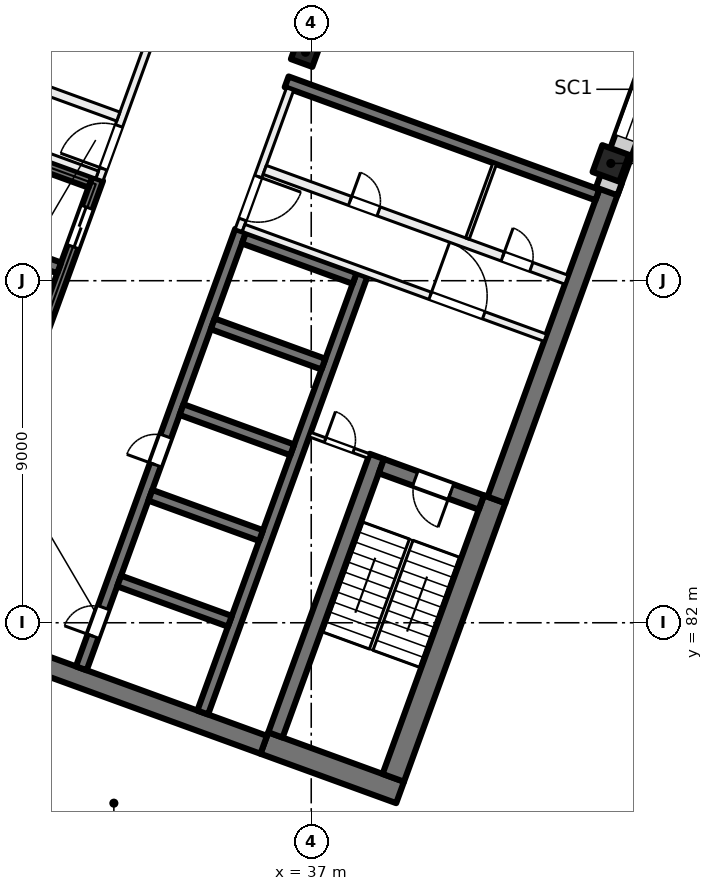
"""IFC4 building model, lengths in metres.
Left out: names, types, materials, properties, quantities, classifications, styles, units other than length and angle.
Written with IfcOpenShell. Run it as: python <this file> out.ifc"""

import sys

from ifc_helpers import new_model, si_unit, direction, frame, frame_2d, origin, origin_2d, place, context, subcontext, project, spatial, rectangle, extrude, element, fill, save


model = new_model("IFC4")
c1 = context("Model", 3, precision=1e-05, world=origin(), true_north=direction((0.0, 1.0)))
c2 = subcontext(c1, "Body", "Model", "MODEL_VIEW")
j1 = project(units=[si_unit("LENGTHUNIT", "METRE"), si_unit("PLANEANGLEUNIT", "RADIAN")], contexts=[c1])
p1 = place(None, origin())
s1 = spatial("IfcSite", under=j1, at=p1, CompositionType="ELEMENT")
p2 = place(p1, origin())
s2 = spatial("IfcBuilding", under=s1, at=p2, CompositionType="ELEMENT")
p3 = place(p2, frame((0.0, 0.0, 200.0)))
s3 = spatial("IfcBuildingStorey", under=s2, at=p3, CompositionType="ELEMENT", Elevation=200.0)
p4 = place(p3, frame((36.849, 97.011, 0.0), z_axis=(0.0, 0.0, 1.0), x_axis=(-0.342020143326, -0.939692620786, 0.0)))
e1 = element("IfcColumn", 1, at=p4, inside=s3, PredefinedType="COLUMN", context=c2, shape_type="SweptSolid", body=[
    extrude(rectangle(XDim=0.6, YDim=0.6, at=origin_2d()), origin(), (0.0, 0.0, 1.0), 4.0),
])
p5 = place(p3, frame((44.884, 94.087, 0.0), z_axis=(0.0, 0.0, 1.0), x_axis=(-0.342020143326, -0.939692620786, 0.0)))
e2 = element("IfcColumn", 2, at=p5, inside=s3, PredefinedType="COLUMN", context=c2, shape_type="SweptSolid", body=[
    extrude(rectangle(XDim=0.75, YDim=0.75, at=origin_2d()), origin(), (0.0, 0.0, 1.0), 4.0),
])
p6 = place(p3, frame((39.338, 77.535, 0.0), z_axis=(0.0, 0.0, 1.0), x_axis=(-0.939701471648, 0.341995824804, 0.0)))
e3 = element("IfcWall", 3, at=p6, inside=s3, PredefinedType="SHEAR", context=c2, shape_type="SweptSolid", body=[
    extrude(rectangle(XDim=3.8, YDim=0.6, at=frame_2d((1.9, 0.0))), origin(), (0.0, 0.0, 1.0), 4.0),
])
p7 = place(p3, frame((35.75, 78.788, 0.0), z_axis=(0.0, 0.0, 1.0), x_axis=(-0.939692894512, 0.342019391267, 0.0)))
e4 = element("IfcWall", 4, at=p7, inside=s3, PredefinedType="SHEAR", context=c2, shape_type="SweptSolid", body=[
    extrude(rectangle(XDim=14.4, YDim=0.5, at=frame_2d((7.2, 0.0))), origin(), (0.0, 0.0, 1.0), 4.0),
])
p8 = place(p3, frame((39.159, 77.92, 0.0), z_axis=(0.0, 0.0, 1.0), x_axis=(0.342016982193, 0.939693771338, 0.0)))
e5 = element("IfcWall", 5, at=p8, inside=s3, PredefinedType="SHEAR", context=c2, shape_type="SweptSolid", body=[
    extrude(rectangle(XDim=7.8, YDim=0.6, at=frame_2d((3.9, 0.0))), origin(), (0.0, 0.0, 1.0), 4.0),
])
p9 = place(p3, frame((41.874, 85.232, 0.0), z_axis=(0.0, 0.0, 1.0), x_axis=(0.342020437038, 0.939692513883, 0.0)))
e6 = element("IfcWall", 6, at=p9, inside=s3, PredefinedType="SHEAR", context=c2, shape_type="SweptSolid", body=[
    extrude(rectangle(XDim=8.975, YDim=0.5, at=frame_2d((4.487, 0.0))), origin(), (0.0, 0.0, 1.0), 4.0),
])
p10 = place(p3, frame((36.058, 79.048, 0.0), z_axis=(0.0, 0.0, 1.0), x_axis=(0.342016982193, 0.939693771338, 0.0)))
e7 = element("IfcWall", 7, at=p10, inside=s3, PredefinedType="SHEAR", context=c2, shape_type="SweptSolid", body=[
    extrude(rectangle(XDim=7.8, YDim=0.4, at=frame_2d((3.9, 0.0))), origin(), (0.0, 0.0, 1.0), 4.0),
])
p11 = place(p3, frame((41.476, 85.164, 0.0), z_axis=(0.0, 0.0, 1.0), x_axis=(-0.939678810556, 0.342058084236, 0.0)))
e8 = element("IfcWall", 8, at=p11, inside=s3, PredefinedType="SHEAR", context=c2, shape_type="SweptSolid", body=[
    extrude(rectangle(XDim=2.8, YDim=0.4, at=frame_2d((1.4, 0.0))), origin(), (0.0, 0.0, 1.0), 4.0),
])
p12 = place(p11, frame((0.85, 0.0, 0.0)))
e9 = element("IfcOpeningElement", 9, at=p12, cuts=e8, PredefinedType="OPENING", context=c2, shape_type="SweptSolid", body=[
    extrude(rectangle(XDim=1.0, YDim=2.1, at=frame_2d((0.5, 1.05))), frame((0.0, 0.21, 0.0), z_axis=(0.0, -1.0, 0.0), x_axis=(1.0, 0.0, 0.0)), (0.0, 0.0, 1.0), 0.42),
])
p13 = place(p3, frame((30.949, 80.801, 0.0), z_axis=(0.0, 0.0, 1.0), x_axis=(0.342016684409, 0.939693879721, 0.0)))
e10 = element("IfcWall", 10, at=p13, inside=s3, PredefinedType="SHEAR", context=c2, shape_type="SweptSolid", body=[
    extrude(rectangle(XDim=12.25, YDim=0.3, at=frame_2d((6.125, 0.0))), origin(), (0.0, 0.0, 1.0), 4.0),
])
p14 = place(p13, frame((0.9, 0.0, 0.0)))
e11 = element("IfcOpeningElement", 11, at=p14, cuts=e10, PredefinedType="OPENING", context=c2, shape_type="SweptSolid", body=[
    extrude(rectangle(XDim=0.8, YDim=2.1, at=frame_2d((0.4, 1.05))), frame((0.0, 0.16, 0.0), z_axis=(0.0, -1.0, 0.0), x_axis=(1.0, 0.0, 0.0)), (0.0, 0.0, 1.0), 0.32),
])
p15 = place(p13, frame((5.7, 0.0, 0.0)))
e12 = element("IfcOpeningElement", 12, at=p15, cuts=e10, PredefinedType="OPENING", context=c2, shape_type="SweptSolid", body=[
    extrude(rectangle(XDim=0.8, YDim=2.1, at=frame_2d((0.4, 1.05))), frame((0.0, 0.16, 0.0), z_axis=(0.0, -1.0, 0.0), x_axis=(1.0, 0.0, 0.0)), (0.0, 0.0, 1.0), 0.32),
])
p16 = place(p3, frame((34.144, 79.638, 0.0), z_axis=(0.0, 0.0, 1.0), x_axis=(0.342016684409, 0.939693879721, 0.0)))
e13 = element("IfcWall", 13, at=p16, inside=s3, PredefinedType="SHEAR", context=c2, shape_type="SweptSolid", body=[
    extrude(rectangle(XDim=12.25, YDim=0.3, at=frame_2d((6.125, 0.0))), origin(), (0.0, 0.0, 1.0), 4.0),
])
p17 = place(p3, frame((34.858, 82.039, 0.0), z_axis=(0.0, 0.0, 1.0), x_axis=(-0.939689908313, 0.342027595692, 0.0)))
e14 = element("IfcWall", 14, at=p17, inside=s3, PredefinedType="SHEAR", context=c2, shape_type="SweptSolid", body=[
    extrude(rectangle(XDim=3.1, YDim=0.3, at=frame_2d((1.55, 0.0))), origin(), (0.0, 0.0, 1.0), 4.0),
])
p18 = place(p3, frame((35.679, 84.294, 0.0), z_axis=(0.0, 0.0, 1.0), x_axis=(-0.939706007505, 0.341983361377, 0.0)))
e15 = element("IfcWall", 15, at=p18, inside=s3, PredefinedType="SHEAR", context=c2, shape_type="SweptSolid", body=[
    extrude(rectangle(XDim=3.1, YDim=0.3, at=frame_2d((1.55, 0.0))), origin(), (0.0, 0.0, 1.0), 4.0),
])
for number, where, z_axis, x_axis in (
    (16, (36.5, 86.549, 0.0), (0.0, 0.0, 1.0), (-0.94, 0.342, 0.0)),
    (17, (37.321, 88.805, 0.0), (0.0, 0.0, 1.0), (-0.94, 0.342, 0.0)),
    (18, (38.142, 91.06, 0.0), (0.0, 0.0, 1.0), (-0.94, 0.342, 0.0)),
):
    element("IfcWall", number, at=place(p3, frame(where, z_axis=z_axis, x_axis=x_axis)), inside=s3, PredefinedType="SHEAR", context=c2, shape_type="SweptSolid", body=[
        extrude(rectangle(XDim=3.1, YDim=0.3, at=frame_2d((1.55, 0.0))), origin(), (0.0, 0.0, 1.0), 4.0),
    ])
p19 = place(p3, frame((27.191, 82.169, 0.0), z_axis=(0.0, 0.0, 1.0), x_axis=(0.342016684409, 0.939693879721, 0.0)))
e19 = element("IfcWall", 19, at=p19, inside=s3, PredefinedType="SHEAR", context=c2, shape_type="SweptSolid", body=[
    extrude(rectangle(XDim=12.25, YDim=0.3, at=frame_2d((6.125, 0.0))), origin(), (0.0, 0.0, 1.0), 4.0),
])
p20 = place(p19, frame((0.75, 0.0, 0.0)))
e20 = element("IfcOpeningElement", 20, at=p20, cuts=e19, PredefinedType="OPENING", context=c2, shape_type="SweptSolid", body=[
    extrude(rectangle(XDim=1.1, YDim=2.1, at=frame_2d((0.55, 1.05))), frame((0.0, 0.16, 0.0), z_axis=(0.0, -1.0, 0.0), x_axis=(1.0, 0.0, 0.0)), (0.0, 0.0, 1.0), 0.32),
])
p21 = place(p19, frame((3.15, 0.0, 0.0)))
e21 = element("IfcOpeningElement", 21, at=p21, cuts=e19, PredefinedType="OPENING", context=c2, shape_type="SweptSolid", body=[
    extrude(rectangle(XDim=1.1, YDim=2.1, at=frame_2d((0.55, 1.05))), frame((0.0, 0.16, 0.0), z_axis=(0.0, -1.0, 0.0), x_axis=(1.0, 0.0, 0.0)), (0.0, 0.0, 1.0), 0.32),
])
p22 = place(p19, frame((5.55, 0.0, 0.0)))
e22 = element("IfcOpeningElement", 22, at=p22, cuts=e19, PredefinedType="OPENING", context=c2, shape_type="SweptSolid", body=[
    extrude(rectangle(XDim=1.1, YDim=2.1, at=frame_2d((0.55, 1.05))), frame((0.0, 0.16, 0.0), z_axis=(0.0, -1.0, 0.0), x_axis=(1.0, 0.0, 0.0)), (0.0, 0.0, 1.0), 0.32),
])
p23 = place(p19, frame((10.35, 0.0, 0.0)))
e23 = element("IfcOpeningElement", 23, at=p23, cuts=e19, PredefinedType="OPENING", context=c2, shape_type="SweptSolid", body=[
    extrude(rectangle(XDim=1.1, YDim=2.1, at=frame_2d((0.55, 1.05))), frame((0.0, 0.16, 0.0), z_axis=(0.0, -1.0, 0.0), x_axis=(1.0, 0.0, 0.0)), (0.0, 0.0, 1.0), 0.32),
])
for number, where, z_axis, x_axis in (
    (24, (30.367, 91.336, 0.0), (0.0, 0.0, 1.0), (-0.94, 0.342, 0.0)),
    (25, (31.188, 93.591, 0.0), (0.0, 0.0, 1.0), (-0.94, 0.342, 0.0)),
):
    element("IfcWall", number, at=place(p3, frame(where, z_axis=z_axis, x_axis=x_axis)), inside=s3, PredefinedType="SHEAR", context=c2, shape_type="SweptSolid", body=[
        extrude(rectangle(XDim=3.1, YDim=0.3, at=frame_2d((1.55, 0.0))), origin(), (0.0, 0.0, 1.0), 4.0),
    ])
p24 = place(p3, frame((44.529, 93.258, 0.0), z_axis=(0.0, 0.0, 1.0), x_axis=(-0.9396917844, 0.342022441267, 0.0)))
e26 = element("IfcWall", 26, at=p24, inside=s3, PredefinedType="SHEAR", context=c2, shape_type="SweptSolid", body=[
    extrude(rectangle(XDim=8.7, YDim=0.3, at=frame_2d((4.35, 0.0))), origin(), (0.0, 0.0, 1.0), 4.0),
])
p25 = place(p3, frame((52.212, 113.783, 0.0), z_axis=(0.0, 0.0, 1.0), x_axis=(-0.34202521188, -0.939690775968, 0.0)))
e27 = element("IfcWall", 27, at=p25, inside=s3, PredefinedType="SOLIDWALL", context=c2, shape_type="SweptSolid", body=[
    extrude(rectangle(XDim=21.745, YDim=0.6, at=frame_2d((10.873, 0.0))), origin(), (0.0, 0.0, 1.0), 3.625),
])
p26 = place(p25, frame((3.765, 0.0, 0.9)))
e28 = element("IfcOpeningElement", 28, at=p26, cuts=e27, PredefinedType="OPENING", context=c2, shape_type="SweptSolid", body=[
    extrude(rectangle(XDim=3.0, YDim=2.4, at=frame_2d((1.5, 1.2))), frame((0.0, 0.31, 0.0), z_axis=(0.0, -1.0, 0.0), x_axis=(1.0, 0.0, 0.0)), (0.0, 0.0, 1.0), 0.62),
])
p27 = place(p25, frame((8.265, 0.0, 0.9)))
e29 = element("IfcOpeningElement", 29, at=p27, cuts=e27, PredefinedType="OPENING", context=c2, shape_type="SweptSolid", body=[
    extrude(rectangle(XDim=3.0, YDim=2.4, at=frame_2d((1.5, 1.2))), frame((0.0, 0.31, 0.0), z_axis=(0.0, -1.0, 0.0), x_axis=(1.0, 0.0, 0.0)), (0.0, 0.0, 1.0), 0.62),
])
p28 = place(p25, frame((12.765, 0.0, 0.9)))
e30 = element("IfcOpeningElement", 30, at=p28, cuts=e27, PredefinedType="OPENING", context=c2, shape_type="SweptSolid", body=[
    extrude(rectangle(XDim=3.0, YDim=2.4, at=frame_2d((1.5, 1.2))), frame((0.0, 0.31, 0.0), z_axis=(0.0, -1.0, 0.0), x_axis=(1.0, 0.0, 0.0)), (0.0, 0.0, 1.0), 0.62),
])
p29 = place(p25, frame((17.265, 0.0, 0.9)))
e31 = element("IfcOpeningElement", 31, at=p29, cuts=e27, PredefinedType="OPENING", context=c2, shape_type="SweptSolid", body=[
    extrude(rectangle(XDim=3.0, YDim=2.4, at=frame_2d((1.5, 1.2))), frame((0.0, 0.31, 0.0), z_axis=(0.0, -1.0, 0.0), x_axis=(1.0, 0.0, 0.0)), (0.0, 0.0, 1.0), 0.62),
])
p30 = place(p3, frame((31.427, 93.663, 0.0), z_axis=(0.0, 0.0, 1.0), x_axis=(0.342030870568, 0.93968871632, 0.0)))
e32 = element("IfcWall", 32, at=p30, inside=s3, PredefinedType="PARTITIONING", context=c2, shape_type="SweptSolid", body=[
    extrude(rectangle(XDim=3.95, YDim=0.2, at=frame_2d((1.975, 0.0))), origin(), (0.0, 0.0, 1.0), 3.625),
])
p31 = place(p30, frame((0.3, 0.0, 0.0)))
e33 = element("IfcOpeningElement", 33, at=p31, cuts=e32, PredefinedType="OPENING", context=c2, shape_type="SweptSolid", body=[
    extrude(rectangle(XDim=1.2, YDim=2.1, at=frame_2d((0.6, 1.05))), frame((0.0, 0.11, 0.0), z_axis=(0.0, -1.0, 0.0), x_axis=(1.0, 0.0, 0.0)), (0.0, 0.0, 1.0), 0.22),
])
p32 = place(p3, frame((23.427, 96.682, 0.0), z_axis=(0.0, 0.0, 1.0), x_axis=(0.939690465531, -0.342026064782, 0.0)))
e34 = element("IfcWall", 34, at=p32, inside=s3, PredefinedType="PARTITIONING", context=c2, shape_type="SweptSolid", body=[
    extrude(rectangle(XDim=8.45, YDim=0.2, at=frame_2d((4.225, 0.0))), origin(), (0.0, 0.0, 1.0), 3.625),
])
p33 = place(p32, frame((1.725, 0.0, 0.0)))
e35 = element("IfcOpeningElement", 35, at=p33, cuts=e34, PredefinedType="OPENING", context=c2, shape_type="SweptSolid", body=[
    extrude(rectangle(XDim=1.5, YDim=2.1, at=frame_2d((0.75, 1.05))), frame((0.0, 0.11, 0.0), z_axis=(0.0, -1.0, 0.0), x_axis=(1.0, 0.0, 0.0)), (0.0, 0.0, 1.0), 0.22),
])
p34 = place(p3, frame((23.983, 98.208, 0.0), z_axis=(0.0, 0.0, 1.0), x_axis=(0.939699751196, -0.342000552051, 0.0)))
e36 = element("IfcWall", 36, at=p34, inside=s3, PredefinedType="PARTITIONING", context=c2, shape_type="SweptSolid", body=[
    extrude(rectangle(XDim=8.45, YDim=0.25, at=frame_2d((4.225, 0.0))), origin(), (0.0, 0.0, 1.0), 3.625),
])
p35 = place(p34, frame((5.26, 0.0, 0.0)))
e37 = element("IfcOpeningElement", 37, at=p35, cuts=e36, PredefinedType="OPENING", context=c2, shape_type="SweptSolid", body=[
    extrude(rectangle(XDim=0.8, YDim=2.1, at=frame_2d((0.4, 1.05))), frame((0.0, 0.135, 0.0), z_axis=(0.0, -1.0, 0.0), x_axis=(1.0, 0.0, 0.0)), (0.0, 0.0, 1.0), 0.27),
])
p36 = place(p34, frame((0.985, 0.0, 0.0)))
e38 = element("IfcOpeningElement", 38, at=p36, cuts=e36, PredefinedType="OPENING", context=c2, shape_type="SweptSolid", body=[
    extrude(rectangle(XDim=0.8, YDim=2.1, at=frame_2d((0.4, 1.05))), frame((0.0, 0.135, 0.0), z_axis=(0.0, -1.0, 0.0), x_axis=(1.0, 0.0, 0.0)), (0.0, 0.0, 1.0), 0.27),
])
p37 = place(p3, frame((36.443, 96.041, 0.0), z_axis=(0.0, 0.0, 1.0), x_axis=(-0.341996156931, -0.939701350773, 0.0)))
e39 = element("IfcWall", 39, at=p37, inside=s3, PredefinedType="PARTITIONING", context=c2, shape_type="SweptSolid", body=[
    extrude(rectangle(XDim=3.95, YDim=0.2, at=frame_2d((1.975, 0.0))), origin(), (0.0, 0.0, 1.0), 3.625),
])
p38 = place(p37, frame((2.45, 0.0, 0.0)))
e40 = element("IfcOpeningElement", 40, at=p38, cuts=e39, PredefinedType="OPENING", context=c2, shape_type="SweptSolid", body=[
    extrude(rectangle(XDim=1.2, YDim=2.1, at=frame_2d((0.6, 1.05))), frame((0.0, 0.11, 0.0), z_axis=(0.0, -1.0, 0.0), x_axis=(1.0, 0.0, 0.0)), (0.0, 0.0, 1.0), 0.22),
])
p39 = place(p3, frame((35.22, 92.389, 0.0), z_axis=(0.0, 0.0, 1.0), x_axis=(0.939690465531, -0.342026064782, 0.0)))
e41 = element("IfcWall", 41, at=p39, inside=s3, PredefinedType="PARTITIONING", context=c2, shape_type="SweptSolid", body=[
    extrude(rectangle(XDim=8.45, YDim=0.2, at=frame_2d((4.225, 0.0))), origin(), (0.0, 0.0, 1.0), 3.625),
])
p40 = place(p39, frame((5.225, 0.0, 0.0)))
e42 = element("IfcOpeningElement", 42, at=p40, cuts=e41, PredefinedType="OPENING", context=c2, shape_type="SweptSolid", body=[
    extrude(rectangle(XDim=1.5, YDim=2.1, at=frame_2d((0.75, 1.05))), frame((0.0, 0.11, 0.0), z_axis=(0.0, -1.0, 0.0), x_axis=(1.0, 0.0, 0.0)), (0.0, 0.0, 1.0), 0.22),
])
p41 = place(p3, frame((35.776, 93.916, 0.0), z_axis=(0.0, 0.0, 1.0), x_axis=(0.939690465531, -0.342026064782, 0.0)))
e43 = element("IfcWall", 43, at=p41, inside=s3, PredefinedType="PARTITIONING", context=c2, shape_type="SweptSolid", body=[
    extrude(rectangle(XDim=8.45, YDim=0.25, at=frame_2d((4.225, 0.0))), origin(), (0.0, 0.0, 1.0), 3.625),
])
p42 = place(p41, frame((2.39, 0.0, 0.0)))
e44 = element("IfcOpeningElement", 44, at=p42, cuts=e43, PredefinedType="OPENING", context=c2, shape_type="SweptSolid", body=[
    extrude(rectangle(XDim=0.8, YDim=2.1, at=frame_2d((0.4, 1.05))), frame((0.0, 0.135, 0.0), z_axis=(0.0, -1.0, 0.0), x_axis=(1.0, 0.0, 0.0)), (0.0, 0.0, 1.0), 0.27),
])
p43 = place(p41, frame((6.665, 0.0, 0.0)))
e45 = element("IfcOpeningElement", 45, at=p43, cuts=e43, PredefinedType="OPENING", context=c2, shape_type="SweptSolid", body=[
    extrude(rectangle(XDim=0.8, YDim=2.1, at=frame_2d((0.4, 1.05))), frame((0.0, 0.135, 0.0), z_axis=(0.0, -1.0, 0.0), x_axis=(1.0, 0.0, 0.0)), (0.0, 0.0, 1.0), 0.27),
])
p44 = place(p3, frame((36.966, 86.952, 0.0), z_axis=(0.0, 0.0, 1.0), x_axis=(0.939672407396, -0.342075674051, 0.0)))
e46 = element("IfcWall", 46, at=p44, inside=s3, PredefinedType="PARTITIONING", context=c2, shape_type="SweptSolid", body=[
    extrude(rectangle(XDim=1.65, YDim=0.125, at=frame_2d((0.825, 0.0))), origin(), (0.0, 0.0, 1.0), 3.625),
])
p45 = place(p44, frame((0.425, 0.0, 0.0)))
e47 = element("IfcOpeningElement", 47, at=p45, cuts=e46, PredefinedType="OPENING", context=c2, shape_type="SweptSolid", body=[
    extrude(rectangle(XDim=0.8, YDim=2.1, at=frame_2d((0.4, 1.05))), frame((0.0, 0.073, 0.0), z_axis=(0.0, -1.0, 0.0), x_axis=(1.0, 0.0, 0.0)), (0.0, 0.0, 1.0), 0.145),
])
p46 = place(p3, frame((41.828, 94.082, 0.0), z_axis=(0.0, 0.0, 1.0), x_axis=(-0.342023078919, -0.939691552312, 0.0)))
e48 = element("IfcWall", 48, at=p46, inside=s3, PredefinedType="PARTITIONING", context=c2, shape_type="SweptSolid", body=[
    extrude(rectangle(XDim=2.1, YDim=0.1, at=frame_2d((1.05, 0.0))), origin(), (0.0, 0.0, 1.0), 3.625),
])
p47 = place(p29, origin())
e49 = element("IfcWindow", 49, at=p47, inside=s3, PartitioningType="SINGLE_PANEL", PredefinedType="WINDOW", context=c2, shape_type="SweptSolid", body=[
    extrude(rectangle(XDim=3.0, YDim=2.4, at=frame_2d((1.5, 1.2))), frame((0.0, 0.03, 0.0), z_axis=(0.0, -1.0, 0.0), x_axis=(1.0, 0.0, 0.0)), (0.0, 0.0, 1.0), 0.06),
])
fill(e31, e49)
p48 = place(p23, origin())
e50 = element("IfcDoor", 50, at=p48, inside=s3, OperationType="DOUBLE_DOOR_SLIDING", PredefinedType="DOOR", context=c2, shape_type="SweptSolid", body=[
    extrude(rectangle(XDim=1.1, YDim=2.1, at=frame_2d((0.55, 1.05))), frame((0.0, 0.025, 0.0), z_axis=(0.0, -1.0, 0.0), x_axis=(1.0, 0.0, 0.0)), (0.0, 0.0, 1.0), 0.05),
])
fill(e23, e50)
p49 = place(p14, origin())
e51 = element("IfcDoor", 51, at=p49, inside=s3, OperationType="SINGLE_SWING_LEFT", PredefinedType="DOOR", context=c2, shape_type="SweptSolid", body=[
    extrude(rectangle(XDim=0.8, YDim=2.1, at=frame_2d((0.4, 1.05))), frame((0.0, 0.025, 0.0), z_axis=(0.0, -1.0, 0.0), x_axis=(1.0, 0.0, 0.0)), (0.0, 0.0, 1.0), 0.05),
])
fill(e11, e51)
p50 = place(p15, origin())
e52 = element("IfcDoor", 52, at=p50, inside=s3, OperationType="SINGLE_SWING_RIGHT", PredefinedType="DOOR", context=c2, shape_type="SweptSolid", body=[
    extrude(rectangle(XDim=0.8, YDim=2.1, at=frame_2d((0.4, 1.05))), frame((0.0, 0.025, 0.0), z_axis=(0.0, -1.0, 0.0), x_axis=(1.0, 0.0, 0.0)), (0.0, 0.0, 1.0), 0.05),
])
fill(e12, e52)
p51 = place(p31, origin())
e53 = element("IfcDoor", 53, at=p51, inside=s3, OperationType="DOUBLE_DOOR_SINGLE_SWING", PredefinedType="DOOR", context=c2, shape_type="SweptSolid", body=[
    extrude(rectangle(XDim=1.2, YDim=2.1, at=frame_2d((0.6, 1.05))), frame((0.0, 0.025, 0.0), z_axis=(0.0, -1.0, 0.0), x_axis=(1.0, 0.0, 0.0)), (0.0, 0.0, 1.0), 0.05),
])
fill(e33, e53)
p52 = place(p38, origin())
e54 = element("IfcDoor", 54, at=p52, inside=s3, OperationType="DOUBLE_DOOR_SINGLE_SWING", PredefinedType="DOOR", context=c2, shape_type="SweptSolid", body=[
    extrude(rectangle(XDim=1.2, YDim=2.1, at=frame_2d((0.6, 1.05))), frame((0.0, 0.025, 0.0), z_axis=(0.0, -1.0, 0.0), x_axis=(1.0, 0.0, 0.0)), (0.0, 0.0, 1.0), 0.05),
])
fill(e40, e54)
p53 = place(p40, origin())
e55 = element("IfcDoor", 55, at=p53, inside=s3, OperationType="DOUBLE_DOOR_SINGLE_SWING", PredefinedType="DOOR", context=c2, shape_type="SweptSolid", body=[
    extrude(rectangle(XDim=1.5, YDim=2.1, at=frame_2d((0.75, 1.05))), frame((0.0, 0.025, 0.0), z_axis=(0.0, -1.0, 0.0), x_axis=(1.0, 0.0, 0.0)), (0.0, 0.0, 1.0), 0.05),
])
fill(e42, e55)
p54 = place(p12, origin())
e56 = element("IfcDoor", 56, at=p54, inside=s3, OperationType="SINGLE_SWING_RIGHT", PredefinedType="DOOR", context=c2, shape_type="SweptSolid", body=[
    extrude(rectangle(XDim=1.0, YDim=2.1, at=frame_2d((0.5, 1.05))), frame((0.0, 0.025, 0.0), z_axis=(0.0, -1.0, 0.0), x_axis=(1.0, 0.0, 0.0)), (0.0, 0.0, 1.0), 0.05),
])
fill(e9, e56)
p55 = place(p45, origin())
e57 = element("IfcDoor", 57, at=p55, inside=s3, OperationType="SINGLE_SWING_LEFT", PredefinedType="DOOR", context=c2, shape_type="SweptSolid", body=[
    extrude(rectangle(XDim=0.8, YDim=2.1, at=frame_2d((0.4, 1.05))), frame((0.0, 0.025, 0.0), z_axis=(0.0, -1.0, 0.0), x_axis=(1.0, 0.0, 0.0)), (0.0, 0.0, 1.0), 0.05),
])
fill(e47, e57)
p56 = place(p42, origin())
e58 = element("IfcDoor", 58, at=p56, inside=s3, OperationType="SINGLE_SWING_RIGHT", PredefinedType="DOOR", context=c2, shape_type="SweptSolid", body=[
    extrude(rectangle(XDim=0.8, YDim=2.1, at=frame_2d((0.4, 1.05))), frame((0.0, 0.025, 0.0), z_axis=(0.0, -1.0, 0.0), x_axis=(1.0, 0.0, 0.0)), (0.0, 0.0, 1.0), 0.05),
])
fill(e44, e58)
p57 = place(p43, origin())
e59 = element("IfcDoor", 59, at=p57, inside=s3, OperationType="SINGLE_SWING_LEFT", PredefinedType="DOOR", context=c2, shape_type="SweptSolid", body=[
    extrude(rectangle(XDim=0.8, YDim=2.1, at=frame_2d((0.4, 1.05))), frame((0.0, 0.025, 0.0), z_axis=(0.0, -1.0, 0.0), x_axis=(1.0, 0.0, 0.0)), (0.0, 0.0, 1.0), 0.05),
])
fill(e45, e59)
save(model, sys.argv[1])
